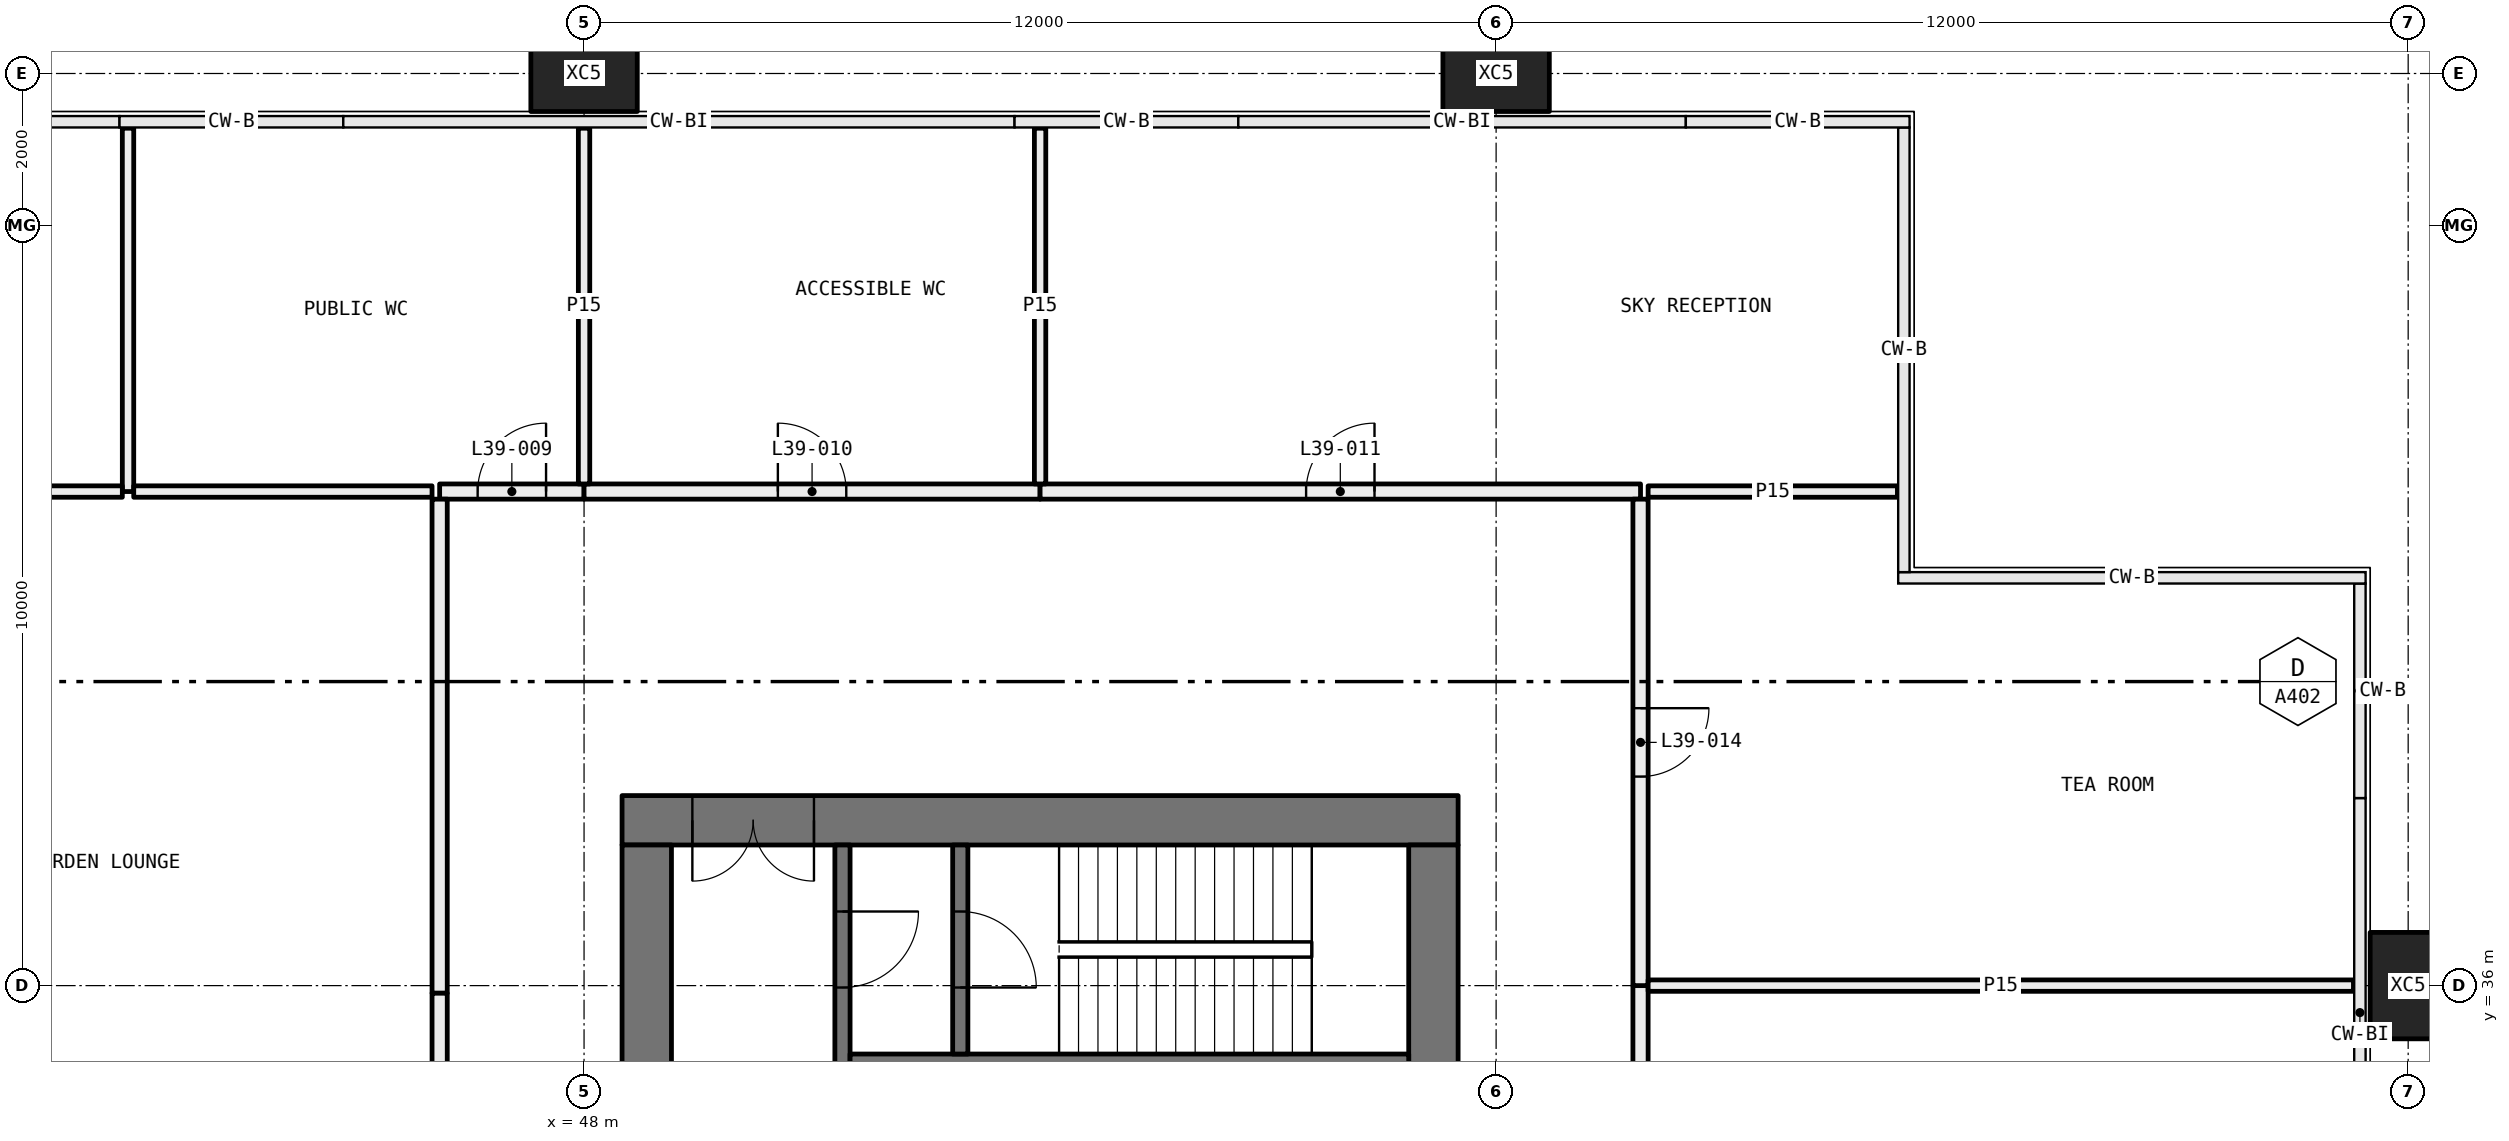
"""IFC4 building model, lengths in metres.
Left out: names, types, materials, properties, quantities, classifications, styles, units other than length and angle.
Written with IfcOpenShell. Run it as: python <this file> out.ifc"""

import sys

from ifc_helpers import new_model, si_unit, direction, frame, frame_2d, origin, origin_2d, place, context, subcontext, project, spatial, rectangle, hollow_rectangle, extrude, element, fill, save


model = new_model("IFC4")
c1 = context("Model", 3, precision=1e-05, world=origin(), true_north=direction((0.0, 1.0)))
c2 = subcontext(c1, "Body", "Model", "MODEL_VIEW")
j1 = project(units=[si_unit("LENGTHUNIT", "METRE"), si_unit("PLANEANGLEUNIT", "RADIAN")], contexts=[c1])
p1 = place(None, origin())
s1 = spatial("IfcSite", under=j1, at=p1, CompositionType="ELEMENT")
p2 = place(p1, origin())
s2 = spatial("IfcBuilding", under=s1, at=p2, CompositionType="ELEMENT")
p3 = place(p2, frame((0.0, 0.0, 148.35)))
s3 = spatial("IfcBuildingStorey", under=s2, at=p3, CompositionType="ELEMENT", Elevation=148.35)
for number, where, z_axis, x_axis in (
    (1, (48.0, 48.0, -0.4), (0.0, 0.0, 1.0), (1.0, 0.0, 0.0)),
    (2, (60.0, 48.0, -0.4), (0.0, 0.0, 1.0), (1.0, 0.0, 0.0)),
    (3, (72.0, 36.0, -0.4), (0.0, 0.0, 1.0), (0.0, 1.0, 0.0)),
):
    element("IfcColumn", number, at=place(p3, frame(where, z_axis=z_axis, x_axis=x_axis)), inside=s3, PredefinedType="COLUMN", context=c2, shape_type="SweptSolid", body=[
        extrude(hollow_rectangle(XDim=1.4, YDim=1.0, WallThickness=0.055, at=origin_2d()), origin(), (0.0, 0.0, 1.0), 5.4),
    ])
p4 = place(p3, frame((48.0, 42.5, 0.0), z_axis=(0.0, 0.0, 1.0), x_axis=(-1.0, 0.0, 0.0)))
e4 = element("IfcWall", 4, at=p4, inside=s3, PredefinedType="PARTITIONING", context=c2, shape_type="SweptSolid", body=[
    extrude(rectangle(XDim=1.9, YDim=0.2, at=frame_2d((0.95, 0.0))), origin(), (0.0, 0.0, 1.0), 5.0),
])
p5 = place(p4, frame((0.5, 0.0, 0.0)))
e5 = element("IfcOpeningElement", 5, at=p5, cuts=e4, PredefinedType="OPENING", context=c2, shape_type="SweptSolid", body=[
    extrude(rectangle(XDim=0.9, YDim=2.1, at=frame_2d((0.45, 1.05))), frame((0.0, 0.11, 0.0), z_axis=(0.0, -1.0, 0.0), x_axis=(1.0, 0.0, 0.0)), (0.0, 0.0, 1.0), 0.22),
])
p6 = place(p3, frame((54.0, 42.5, 0.0), z_axis=(0.0, 0.0, 1.0), x_axis=(-1.0, 0.0, 0.0)))
e6 = element("IfcWall", 6, at=p6, inside=s3, PredefinedType="PARTITIONING", context=c2, shape_type="SweptSolid", body=[
    extrude(rectangle(XDim=6.0, YDim=0.2, at=frame_2d((3.0, 0.0))), origin(), (0.0, 0.0, 1.0), 5.0),
])
p7 = place(p6, frame((2.55, 0.0, 0.0)))
e7 = element("IfcOpeningElement", 7, at=p7, cuts=e6, PredefinedType="OPENING", context=c2, shape_type="SweptSolid", body=[
    extrude(rectangle(XDim=0.9, YDim=2.1, at=frame_2d((0.45, 1.05))), frame((0.0, 0.11, 0.0), z_axis=(0.0, -1.0, 0.0), x_axis=(1.0, 0.0, 0.0)), (0.0, 0.0, 1.0), 0.22),
])
p8 = place(p3, frame((61.9, 42.5, 0.0), z_axis=(0.0, 0.0, 1.0), x_axis=(-1.0, 0.0, 0.0)))
e8 = element("IfcWall", 8, at=p8, inside=s3, PredefinedType="PARTITIONING", context=c2, shape_type="SweptSolid", body=[
    extrude(rectangle(XDim=7.9, YDim=0.2, at=frame_2d((3.95, 0.0))), origin(), (0.0, 0.0, 1.0), 5.0),
])
p9 = place(p8, frame((3.5, 0.0, 0.0)))
e9 = element("IfcOpeningElement", 9, at=p9, cuts=e8, PredefinedType="OPENING", context=c2, shape_type="SweptSolid", body=[
    extrude(rectangle(XDim=0.9, YDim=2.1, at=frame_2d((0.45, 1.05))), frame((0.0, 0.11, 0.0), z_axis=(0.0, -1.0, 0.0), x_axis=(1.0, 0.0, 0.0)), (0.0, 0.0, 1.0), 0.22),
])
p10 = place(p3, frame((61.9, 18.1, 0.0), z_axis=(0.0, 0.0, 1.0), x_axis=(0.0, 1.0, 0.0)))
e10 = element("IfcWall", 10, at=p10, inside=s3, PredefinedType="PARTITIONING", context=c2, shape_type="SweptSolid", body=[
    extrude(rectangle(XDim=17.9, YDim=0.2, at=frame_2d((8.95, 0.0))), origin(), (0.0, 0.0, 1.0), 4.4),
])
p11 = place(p10, frame((8.15, 0.0, 0.0)))
e11 = element("IfcOpeningElement", 11, at=p11, cuts=e10, PredefinedType="OPENING", context=c2, shape_type="SweptSolid", body=[
    extrude(rectangle(XDim=1.6, YDim=2.1, at=frame_2d((0.8, 1.05))), frame((0.0, 0.11, 0.0), z_axis=(0.0, -1.0, 0.0), x_axis=(1.0, 0.0, 0.0)), (0.0, 0.0, 1.0), 0.22),
])
p12 = place(p3, frame((61.9, 36.0, 0.0), z_axis=(0.0, 0.0, 1.0), x_axis=(0.0, 1.0, 0.0)))
e12 = element("IfcWall", 12, at=p12, inside=s3, PredefinedType="PARTITIONING", context=c2, shape_type="SweptSolid", body=[
    extrude(rectangle(XDim=6.4, YDim=0.2, at=frame_2d((3.2, 0.0))), origin(), (0.0, 0.0, 1.0), 4.4),
])
p13 = place(p12, frame((2.75, 0.0, 0.0)))
e13 = element("IfcOpeningElement", 13, at=p13, cuts=e12, PredefinedType="OPENING", context=c2, shape_type="SweptSolid", body=[
    extrude(rectangle(XDim=0.9, YDim=2.1, at=frame_2d((0.45, 1.05))), frame((0.0, 0.11, 0.0), z_axis=(0.0, -1.0, 0.0), x_axis=(1.0, 0.0, 0.0)), (0.0, 0.0, 1.0), 0.22),
])
p14 = place(p3, frame((46.1, 42.4, 0.0), z_axis=(0.0, 0.0, 1.0), x_axis=(0.0, -1.0, 0.0)))
e14 = element("IfcWall", 14, at=p14, inside=s3, PredefinedType="PARTITIONING", context=c2, shape_type="SweptSolid", body=[
    extrude(rectangle(XDim=6.5, YDim=0.2, at=frame_2d((3.25, 0.0))), origin(), (0.0, 0.0, 1.0), 4.4),
])
p15 = place(p3, frame((46.1, 35.9, 0.0), z_axis=(0.0, 0.0, 1.0), x_axis=(0.0, -1.0, 0.0)))
e15 = element("IfcWall", 15, at=p15, inside=s3, PredefinedType="PARTITIONING", context=c2, shape_type="SweptSolid", body=[
    extrude(rectangle(XDim=4.7, YDim=0.2, at=frame_2d((2.35, 0.0))), origin(), (0.0, 0.0, 1.0), 5.0),
])
p16 = place(p3, frame((42.0, 42.5, 0.0), z_axis=(0.0, 0.0, 1.0), x_axis=(0.0, 1.0, 0.0)))
e16 = element("IfcWall", 16, at=p16, inside=s3, PredefinedType="PARTITIONING", context=c2, shape_type="SweptSolid", body=[
    extrude(rectangle(XDim=4.78, YDim=0.15, at=frame_2d((2.39, 0.0))), origin(), (0.0, 0.0, 1.0), 5.0),
])
p17 = place(p3, frame((36.1, 42.5, 0.0), z_axis=(0.0, 0.0, 1.0), x_axis=(1.0, 0.0, 0.0)))
e17 = element("IfcWall", 17, at=p17, inside=s3, PredefinedType="PARTITIONING", context=c2, shape_type="SweptSolid", body=[
    extrude(rectangle(XDim=5.825, YDim=0.15, at=frame_2d((2.913, 0.0))), origin(), (0.0, 0.0, 1.0), 5.0),
])
p18 = place(p3, frame((48.0, 42.6, 0.0), z_axis=(0.0, 0.0, 1.0), x_axis=(0.0, 1.0, 0.0)))
e18 = element("IfcWall", 18, at=p18, inside=s3, PredefinedType="PARTITIONING", context=c2, shape_type="SweptSolid", body=[
    extrude(rectangle(XDim=4.68, YDim=0.15, at=frame_2d((2.34, 0.0))), origin(), (0.0, 0.0, 1.0), 5.0),
])
p19 = place(p3, frame((42.075, 42.5, 0.0), z_axis=(0.0, 0.0, 1.0), x_axis=(1.0, 0.0, 0.0)))
e19 = element("IfcWall", 19, at=p19, inside=s3, PredefinedType="PARTITIONING", context=c2, shape_type="SweptSolid", body=[
    extrude(rectangle(XDim=3.925, YDim=0.15, at=frame_2d((1.962, 0.0))), origin(), (0.0, 0.0, 1.0), 5.0),
])
p20 = place(p3, frame((54.0, 42.6, 0.0), z_axis=(0.0, 0.0, 1.0), x_axis=(0.0, 1.0, 0.0)))
e20 = element("IfcWall", 20, at=p20, inside=s3, PredefinedType="PARTITIONING", context=c2, shape_type="SweptSolid", body=[
    extrude(rectangle(XDim=4.68, YDim=0.15, at=frame_2d((2.34, 0.0))), origin(), (0.0, 0.0, 1.0), 5.0),
])
p21 = place(p3, frame((62.0, 42.5, 0.0), z_axis=(0.0, 0.0, 1.0), x_axis=(1.0, 0.0, 0.0)))
e21 = element("IfcWall", 21, at=p21, inside=s3, PredefinedType="PARTITIONING", context=c2, shape_type="SweptSolid", body=[
    extrude(rectangle(XDim=3.28, YDim=0.15, at=frame_2d((1.64, 0.0))), origin(), (0.0, 0.0, 1.0), 5.0),
])
p22 = place(p3, frame((71.28, 36.0, 0.0), z_axis=(0.0, 0.0, 1.0), x_axis=(-1.0, 0.0, 0.0)))
e22 = element("IfcWall", 22, at=p22, inside=s3, PredefinedType="PARTITIONING", context=c2, shape_type="SweptSolid", body=[
    extrude(rectangle(XDim=9.28, YDim=0.15, at=frame_2d((4.64, 0.0))), origin(), (0.0, 0.0, 1.0), 4.4),
])
p23 = place(p3, frame((59.5, 38.175, 0.0), z_axis=(0.0, 0.0, 1.0), x_axis=(-1.0, 0.0, 0.0)))
e23 = element("IfcWall", 23, at=p23, inside=s3, PredefinedType="SHEAR", context=c2, shape_type="SweptSolid", body=[
    extrude(rectangle(XDim=11.0, YDim=0.65, at=frame_2d((5.5, 0.0))), origin(), (0.0, 0.0, 1.0), 5.0),
])
p24 = place(p23, frame((8.475, 0.0, 0.0)))
e24 = element("IfcOpeningElement", 24, at=p24, cuts=e23, PredefinedType="OPENING", context=c2, shape_type="SweptSolid", body=[
    extrude(rectangle(XDim=1.6, YDim=2.1, at=frame_2d((0.8, 1.05))), frame((0.0, 0.335, 0.0), z_axis=(0.0, -1.0, 0.0), x_axis=(1.0, 0.0, 0.0)), (0.0, 0.0, 1.0), 0.67),
])
p25 = place(p3, frame((59.175, 22.15, 0.0), z_axis=(0.0, 0.0, 1.0), x_axis=(0.0, 1.0, 0.0)))
e25 = element("IfcWall", 25, at=p25, inside=s3, PredefinedType="SHEAR", context=c2, shape_type="SweptSolid", body=[
    extrude(rectangle(XDim=15.7, YDim=0.65, at=frame_2d((7.85, 0.0))), origin(), (0.0, 0.0, 1.0), 5.0),
])
p26 = place(p25, frame((8.3, 0.0, 0.0)))
e26 = element("IfcOpeningElement", 26, at=p26, cuts=e25, PredefinedType="OPENING", context=c2, shape_type="SweptSolid", body=[
    extrude(rectangle(XDim=1.6, YDim=2.1, at=frame_2d((0.8, 1.05))), frame((0.0, 0.335, 0.0), z_axis=(0.0, -1.0, 0.0), x_axis=(1.0, 0.0, 0.0)), (0.0, 0.0, 1.0), 0.67),
])
p27 = place(p25, frame((2.125, 0.0, 0.0)))
e27 = element("IfcOpeningElement", 27, at=p27, cuts=e25, PredefinedType="OPENING", context=c2, shape_type="SweptSolid", body=[
    extrude(rectangle(XDim=1.0, YDim=2.1, at=frame_2d((0.5, 1.05))), frame((0.0, 0.335, 0.0), z_axis=(0.0, -1.0, 0.0), x_axis=(1.0, 0.0, 0.0)), (0.0, 0.0, 1.0), 0.67),
])
p28 = place(p3, frame((48.825, 22.15, 0.0), z_axis=(0.0, 0.0, 1.0), x_axis=(0.0, 1.0, 0.0)))
e28 = element("IfcWall", 28, at=p28, inside=s3, PredefinedType="SHEAR", context=c2, shape_type="SweptSolid", body=[
    extrude(rectangle(XDim=15.7, YDim=0.65, at=frame_2d((7.85, 0.0))), origin(), (0.0, 0.0, 1.0), 5.0),
])
p29 = place(p28, frame((7.05, 0.0, 0.0)))
e29 = element("IfcOpeningElement", 29, at=p29, cuts=e28, PredefinedType="OPENING", context=c2, shape_type="SweptSolid", body=[
    extrude(rectangle(XDim=1.6, YDim=2.1, at=frame_2d((0.8, 1.05))), frame((0.0, 0.335, 0.0), z_axis=(0.0, -1.0, 0.0), x_axis=(1.0, 0.0, 0.0)), (0.0, 0.0, 1.0), 0.67),
])
p30 = place(p3, frame((51.4, 25.1, 0.0), z_axis=(0.0, 0.0, 1.0), x_axis=(0.0, 1.0, 0.0)))
e30 = element("IfcWall", 30, at=p30, inside=s3, PredefinedType="SOLIDWALL", context=c2, shape_type="SweptSolid", body=[
    extrude(rectangle(XDim=12.75, YDim=0.2, at=frame_2d((6.375, 0.0))), origin(), (0.0, 0.0, 1.0), 5.0),
])
p31 = place(p30, frame((0.6, 0.0, 0.0)))
e31 = element("IfcOpeningElement", 31, at=p31, cuts=e30, PredefinedType="OPENING", context=c2, shape_type="SweptSolid", body=[
    extrude(rectangle(XDim=1.1, YDim=2.1, at=frame_2d((0.55, 1.05))), frame((0.0, 0.11, 0.0), z_axis=(0.0, -1.0, 0.0), x_axis=(1.0, 0.0, 0.0)), (0.0, 0.0, 1.0), 0.22),
])
p32 = place(p30, frame((3.1, 0.0, 0.0)))
e32 = element("IfcOpeningElement", 32, at=p32, cuts=e30, PredefinedType="OPENING", context=c2, shape_type="SweptSolid", body=[
    extrude(rectangle(XDim=1.1, YDim=2.1, at=frame_2d((0.55, 1.05))), frame((0.0, 0.11, 0.0), z_axis=(0.0, -1.0, 0.0), x_axis=(1.0, 0.0, 0.0)), (0.0, 0.0, 1.0), 0.22),
])
p33 = place(p30, frame((5.6, 0.0, 0.0)))
e33 = element("IfcOpeningElement", 33, at=p33, cuts=e30, PredefinedType="OPENING", context=c2, shape_type="SweptSolid", body=[
    extrude(rectangle(XDim=1.1, YDim=2.1, at=frame_2d((0.55, 1.05))), frame((0.0, 0.11, 0.0), z_axis=(0.0, -1.0, 0.0), x_axis=(1.0, 0.0, 0.0)), (0.0, 0.0, 1.0), 0.22),
])
p34 = place(p30, frame((8.1, 0.0, 0.0)))
e34 = element("IfcOpeningElement", 34, at=p34, cuts=e30, PredefinedType="OPENING", context=c2, shape_type="SweptSolid", body=[
    extrude(rectangle(XDim=1.1, YDim=2.1, at=frame_2d((0.55, 1.05))), frame((0.0, 0.11, 0.0), z_axis=(0.0, -1.0, 0.0), x_axis=(1.0, 0.0, 0.0)), (0.0, 0.0, 1.0), 0.22),
])
p35 = place(p30, frame((10.875, 0.0, 0.0)))
e35 = element("IfcOpeningElement", 35, at=p35, cuts=e30, PredefinedType="OPENING", context=c2, shape_type="SweptSolid", body=[
    extrude(rectangle(XDim=1.0, YDim=2.1, at=frame_2d((0.5, 1.05))), frame((0.0, 0.11, 0.0), z_axis=(0.0, -1.0, 0.0), x_axis=(1.0, 0.0, 0.0)), (0.0, 0.0, 1.0), 0.22),
])
p36 = place(p3, frame((58.85, 35.0, 0.0), z_axis=(0.0, 0.0, 1.0), x_axis=(-1.0, 0.0, 0.0)))
e36 = element("IfcWall", 36, at=p36, inside=s3, PredefinedType="SOLIDWALL", context=c2, shape_type="SweptSolid", body=[
    extrude(rectangle(XDim=7.35, YDim=0.2, at=frame_2d((3.675, 0.0))), origin(), (0.0, 0.0, 1.0), 5.0),
])
p37 = place(p3, frame((52.95, 35.1, 0.0), z_axis=(0.0, 0.0, 1.0), x_axis=(0.0, 1.0, 0.0)))
e37 = element("IfcWall", 37, at=p37, inside=s3, PredefinedType="SOLIDWALL", context=c2, shape_type="SweptSolid", body=[
    extrude(rectangle(XDim=2.75, YDim=0.2, at=frame_2d((1.375, 0.0))), origin(), (0.0, 0.0, 1.0), 5.0),
])
p38 = place(p37, frame((0.875, 0.0, 0.0)))
e38 = element("IfcOpeningElement", 38, at=p38, cuts=e37, PredefinedType="OPENING", context=c2, shape_type="SweptSolid", body=[
    extrude(rectangle(XDim=1.0, YDim=2.1, at=frame_2d((0.5, 1.05))), frame((0.0, 0.11, 0.0), z_axis=(0.0, -1.0, 0.0), x_axis=(1.0, 0.0, 0.0)), (0.0, 0.0, 1.0), 0.22),
])
p39 = place(p5, frame((0.9, 0.0, 0.0), x_axis=(-1.0, 0.0, 0.0)))
e39 = element("IfcDoor", 39, at=p39, inside=s3, OperationType="SINGLE_SWING_LEFT", PredefinedType="DOOR", context=c2, shape_type="SweptSolid", body=[
    extrude(rectangle(XDim=0.9, YDim=2.1, at=frame_2d((0.45, 1.05))), frame((0.0, 0.025, 0.0), z_axis=(0.0, -1.0, 0.0), x_axis=(1.0, 0.0, 0.0)), (0.0, 0.0, 1.0), 0.05),
])
fill(e5, e39)
p40 = place(p7, frame((0.9, 0.0, 0.0), x_axis=(-1.0, 0.0, 0.0)))
e40 = element("IfcDoor", 40, at=p40, inside=s3, OperationType="SINGLE_SWING_RIGHT", PredefinedType="DOOR", context=c2, shape_type="SweptSolid", body=[
    extrude(rectangle(XDim=0.9, YDim=2.1, at=frame_2d((0.45, 1.05))), frame((0.0, 0.025, 0.0), z_axis=(0.0, -1.0, 0.0), x_axis=(1.0, 0.0, 0.0)), (0.0, 0.0, 1.0), 0.05),
])
fill(e7, e40)
p41 = place(p9, frame((0.9, 0.0, 0.0), x_axis=(-1.0, 0.0, 0.0)))
e41 = element("IfcDoor", 41, at=p41, inside=s3, OperationType="SINGLE_SWING_LEFT", PredefinedType="DOOR", context=c2, shape_type="SweptSolid", body=[
    extrude(rectangle(XDim=0.9, YDim=2.1, at=frame_2d((0.45, 1.05))), frame((0.0, 0.025, 0.0), z_axis=(0.0, -1.0, 0.0), x_axis=(1.0, 0.0, 0.0)), (0.0, 0.0, 1.0), 0.05),
])
fill(e9, e41)
p42 = place(p13, frame((0.9, 0.0, 0.0), x_axis=(-1.0, 0.0, 0.0)))
e42 = element("IfcDoor", 42, at=p42, inside=s3, OperationType="SINGLE_SWING_RIGHT", PredefinedType="DOOR", context=c2, shape_type="SweptSolid", body=[
    extrude(rectangle(XDim=0.9, YDim=2.1, at=frame_2d((0.45, 1.05))), frame((0.0, 0.025, 0.0), z_axis=(0.0, -1.0, 0.0), x_axis=(1.0, 0.0, 0.0)), (0.0, 0.0, 1.0), 0.05),
])
fill(e13, e42)
p43 = place(p35, frame((1.0, 0.0, 0.0), x_axis=(-1.0, 0.0, 0.0)))
e43 = element("IfcDoor", 43, at=p43, inside=s3, OperationType="SINGLE_SWING_RIGHT", PredefinedType="DOOR", context=c2, shape_type="SweptSolid", body=[
    extrude(rectangle(XDim=1.0, YDim=2.1, at=frame_2d((0.5, 1.05))), frame((0.0, 0.025, 0.0), z_axis=(0.0, -1.0, 0.0), x_axis=(1.0, 0.0, 0.0)), (0.0, 0.0, 1.0), 0.05),
])
fill(e35, e43)
p44 = place(p38, frame((1.0, 0.0, 0.0), x_axis=(-1.0, 0.0, 0.0)))
e44 = element("IfcDoor", 44, at=p44, inside=s3, OperationType="SINGLE_SWING_LEFT", PredefinedType="DOOR", context=c2, shape_type="SweptSolid", body=[
    extrude(rectangle(XDim=1.0, YDim=2.1, at=frame_2d((0.5, 1.05))), frame((0.0, 0.025, 0.0), z_axis=(0.0, -1.0, 0.0), x_axis=(1.0, 0.0, 0.0)), (0.0, 0.0, 1.0), 0.05),
])
fill(e38, e44)
p45 = place(p24, origin())
e45 = element("IfcDoor", 45, at=p45, inside=s3, OperationType="DOUBLE_DOOR_SINGLE_SWING", PredefinedType="DOOR", context=c2, shape_type="SweptSolid", body=[
    extrude(rectangle(XDim=1.6, YDim=2.1, at=frame_2d((0.8, 1.05))), frame((0.0, 0.025, 0.0), z_axis=(0.0, -1.0, 0.0), x_axis=(1.0, 0.0, 0.0)), (0.0, 0.0, 1.0), 0.05),
])
fill(e24, e45)
save(model, sys.argv[1])
